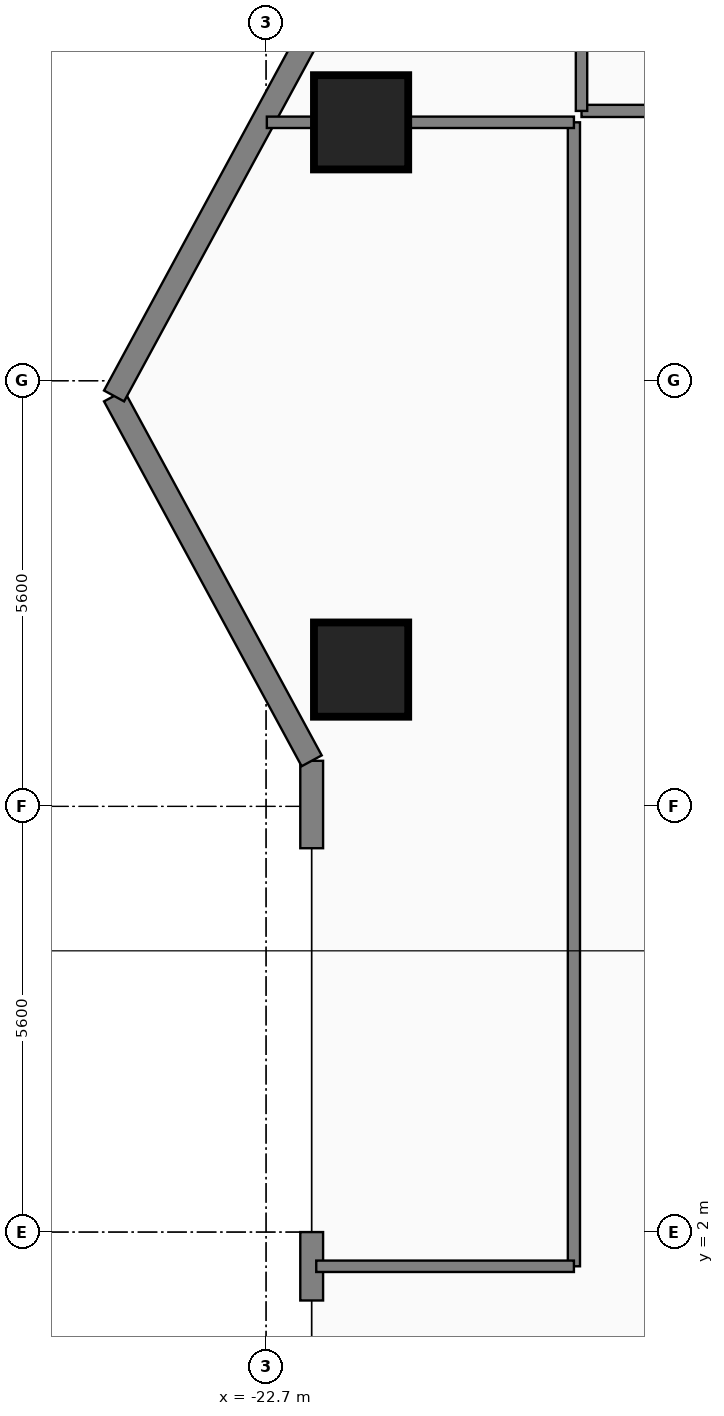
"""IFC4 building model, lengths in metres.
Left out: names, types, materials, properties, quantities, classifications, styles, units other than length and angle.
Written with IfcOpenShell. Run it as: python <this file> out.ifc"""

import sys

from ifc_helpers import new_model, si_unit, direction, frame, frame_2d, origin, origin_2d, place, context, subcontext, project, spatial, rectangle, extrude, element, fill, save


model = new_model("IFC4")
c1 = context("Model", 3, precision=1e-05, world=origin(), true_north=direction((0.0, 1.0)))
c2 = subcontext(c1, "Body", "Model", "MODEL_VIEW")
j1 = project(units=[si_unit("LENGTHUNIT", "METRE"), si_unit("PLANEANGLEUNIT", "RADIAN")], contexts=[c1])
p1 = place(None, origin())
s1 = spatial("IfcSite", under=j1, at=p1, CompositionType="ELEMENT")
p2 = place(p1, origin())
s2 = spatial("IfcBuilding", under=s1, at=p2, CompositionType="ELEMENT")
p3 = place(p2, frame((0.0, 0.0, 168.2)))
s3 = spatial("IfcBuildingStorey", under=s2, at=p3, CompositionType="ELEMENT", Elevation=168.2)
for number, where, z_axis, x_axis in (
    (1, (-21.45, 9.4, 0.43), (0.0, 0.0, 1.0), (1.0, 0.0, 0.0)),
    (2, (-21.45, 16.6, 0.43), (0.0, 0.0, 1.0), (1.0, 0.0, 0.0)),
):
    element("IfcColumn", number, at=place(p3, frame(where, z_axis=z_axis, x_axis=x_axis)), inside=s3, PredefinedType="COLUMN", context=c2, shape_type="SweptSolid", body=[
        extrude(rectangle(XDim=1.2, YDim=1.2, at=origin_2d()), origin(), (0.0, 0.0, 1.0), 4.17),
    ])
p4 = place(p3, frame((-22.1, 1.1, 0.0), z_axis=(0.0, 0.0, 1.0), x_axis=(0.0, 1.0, 0.0)))
e3 = element("IfcWall", 3, at=p4, inside=s3, PredefinedType="STANDARD", context=c2, shape_type="SweptSolid", body=[
    extrude(rectangle(XDim=0.9, YDim=0.3, at=frame_2d((0.45, 0.0))), origin(), (0.0, 0.0, 1.0), 4.38),
])
p5 = place(p3, frame((-22.1, 7.05, 0.0), z_axis=(0.0, 0.0, 1.0), x_axis=(0.0, 1.0, 0.0)))
e4 = element("IfcWall", 4, at=p5, inside=s3, PredefinedType="STANDARD", context=c2, shape_type="SweptSolid", body=[
    extrude(rectangle(XDim=1.15, YDim=0.3, at=frame_2d((0.575, 0.0))), origin(), (0.0, 0.0, 1.0), 4.38),
])
p6 = place(p3, frame((-22.1, 8.2, 0.0), z_axis=(0.0, 0.0, 1.0), x_axis=(-0.476258655584, 0.879305233114, 0.0)))
e5 = element("IfcWall", 5, at=p6, inside=s3, PredefinedType="STANDARD", context=c2, shape_type="SweptSolid", body=[
    extrude(rectangle(XDim=5.459, YDim=0.3, at=frame_2d((2.729, 0.0))), origin(), (0.0, 0.0, 1.0), 4.38),
])
p7 = place(p6, frame((2.155, 0.0, 1.25)))
e6 = element("IfcOpeningElement", 6, at=p7, cuts=e5, PredefinedType="OPENING", context=c2, shape_type="SweptSolid", body=[
    extrude(rectangle(XDim=1.15, YDim=1.55, at=frame_2d((0.575, 0.775))), frame((0.0, 0.16, 0.0), z_axis=(0.0, -1.0, 0.0), x_axis=(1.0, 0.0, 0.0)), (0.0, 0.0, 1.0), 0.32),
])
p8 = place(p3, frame((-24.7, 13.0, 0.0), z_axis=(0.0, 0.0, 1.0), x_axis=(0.476258655584, 0.879305233114, 0.0)))
e7 = element("IfcWall", 7, at=p8, inside=s3, PredefinedType="STANDARD", context=c2, shape_type="SweptSolid", body=[
    extrude(rectangle(XDim=5.459, YDim=0.3, at=frame_2d((2.729, 0.0))), origin(), (0.0, 0.0, 1.0), 4.38),
])
p9 = place(p8, frame((1.476, 0.0, 1.25)))
e8 = element("IfcOpeningElement", 8, at=p9, cuts=e7, PredefinedType="OPENING", context=c2, shape_type="SweptSolid", body=[
    extrude(rectangle(XDim=1.15, YDim=1.55, at=frame_2d((0.575, 0.775))), frame((0.0, 0.16, 0.0), z_axis=(0.0, -1.0, 0.0), x_axis=(1.0, 0.0, 0.0)), (0.0, 0.0, 1.0), 0.32),
])
p10 = place(p3, frame((-18.55, 16.75, 0.0), z_axis=(0.0, 0.0, 1.0), x_axis=(1.0, 0.0, 0.0)))
e9 = element("IfcWall", 9, at=p10, inside=s3, PredefinedType="PARTITIONING", context=c2, shape_type="SweptSolid", body=[
    extrude(rectangle(XDim=17.57, YDim=0.16, at=frame_2d((8.785, 0.0))), origin(), (0.0, 0.0, 1.0), 3.974),
])
p11 = place(p10, frame((11.16, 0.0, 0.0)))
e10 = element("IfcOpeningElement", 10, at=p11, cuts=e9, PredefinedType="OPENING", context=c2, shape_type="SweptSolid", body=[
    extrude(rectangle(XDim=1.08, YDim=2.18, at=frame_2d((0.54, 1.09))), frame((0.0, 0.09, 0.0), z_axis=(0.0, -1.0, 0.0), x_axis=(1.0, 0.0, 0.0)), (0.0, 0.0, 1.0), 0.18),
])
p12 = place(p3, frame((-18.65, 1.55, 0.0), z_axis=(0.0, 0.0, 1.0), x_axis=(0.0, 1.0, 0.0)))
e11 = element("IfcWall", 11, at=p12, inside=s3, PredefinedType="PARTITIONING", context=c2, shape_type="SweptSolid", body=[
    extrude(rectangle(XDim=15.05, YDim=0.16, at=frame_2d((7.525, 0.0))), origin(), (0.0, 0.0, 1.0), 4.38),
])
p13 = place(p12, frame((6.985, 0.0, 0.0)))
e12 = element("IfcOpeningElement", 12, at=p13, cuts=e11, PredefinedType="OPENING", context=c2, shape_type="SweptSolid", body=[
    extrude(rectangle(XDim=1.08, YDim=2.18, at=frame_2d((0.54, 1.09))), frame((0.0, 0.09, 0.0), z_axis=(0.0, -1.0, 0.0), x_axis=(1.0, 0.0, 0.0)), (0.0, 0.0, 1.0), 0.18),
])
p14 = place(p3, frame((-18.55, 16.75, 0.0), z_axis=(0.0, 0.0, 1.0), x_axis=(0.0, 1.0, 0.0)))
e13 = element("IfcWall", 13, at=p14, inside=s3, PredefinedType="PARTITIONING", context=c2, shape_type="SweptSolid", body=[
    extrude(rectangle(XDim=8.2, YDim=0.15, at=frame_2d((4.1, 0.0))), origin(), (0.0, 0.0, 1.0), 4.38),
])
p15 = place(p3, frame((-22.04, 1.55, 0.0), z_axis=(0.0, 0.0, 1.0), x_axis=(1.0, 0.0, 0.0)))
e14 = element("IfcWall", 14, at=p15, inside=s3, PredefinedType="PARTITIONING", context=c2, shape_type="SweptSolid", body=[
    extrude(rectangle(XDim=3.39, YDim=0.15, at=frame_2d((1.695, 0.0))), origin(), (0.0, 0.0, 1.0), 4.38),
])
p16 = place(p3, frame((-22.69, 16.6, 0.0), z_axis=(0.0, 0.0, 1.0), x_axis=(1.0, 0.0, 0.0)))
e15 = element("IfcWall", 15, at=p16, inside=s3, PredefinedType="PARTITIONING", context=c2, shape_type="SweptSolid", body=[
    extrude(rectangle(XDim=4.04, YDim=0.15, at=frame_2d((2.02, 0.0))), origin(), (0.0, 0.0, 1.0), 4.38),
])
p17 = place(p7, origin())
e16 = element("IfcWindow", 16, at=p17, inside=s3, PartitioningType="SINGLE_PANEL", PredefinedType="WINDOW", context=c2, shape_type="SweptSolid", body=[
    extrude(rectangle(XDim=1.15, YDim=1.55, at=frame_2d((0.575, 0.775))), frame((0.0, 0.03, 0.0), z_axis=(0.0, -1.0, 0.0), x_axis=(1.0, 0.0, 0.0)), (0.0, 0.0, 1.0), 0.06),
])
fill(e6, e16)
p18 = place(p9, origin())
e17 = element("IfcWindow", 17, at=p18, inside=s3, PartitioningType="SINGLE_PANEL", PredefinedType="WINDOW", context=c2, shape_type="SweptSolid", body=[
    extrude(rectangle(XDim=1.15, YDim=1.55, at=frame_2d((0.575, 0.775))), frame((0.0, 0.03, 0.0), z_axis=(0.0, -1.0, 0.0), x_axis=(1.0, 0.0, 0.0)), (0.0, 0.0, 1.0), 0.06),
])
fill(e8, e17)
p19 = place(p13, origin())
e18 = element("IfcDoor", 18, at=p19, inside=s3, OperationType="SINGLE_SWING_LEFT", PredefinedType="DOOR", context=c2, shape_type="SweptSolid", body=[
    extrude(rectangle(XDim=1.08, YDim=2.18, at=frame_2d((0.54, 1.09))), frame((0.0, 0.025, 0.0), z_axis=(0.0, -1.0, 0.0), x_axis=(1.0, 0.0, 0.0)), (0.0, 0.0, 1.0), 0.05),
])
fill(e12, e18)
save(model, sys.argv[1])
